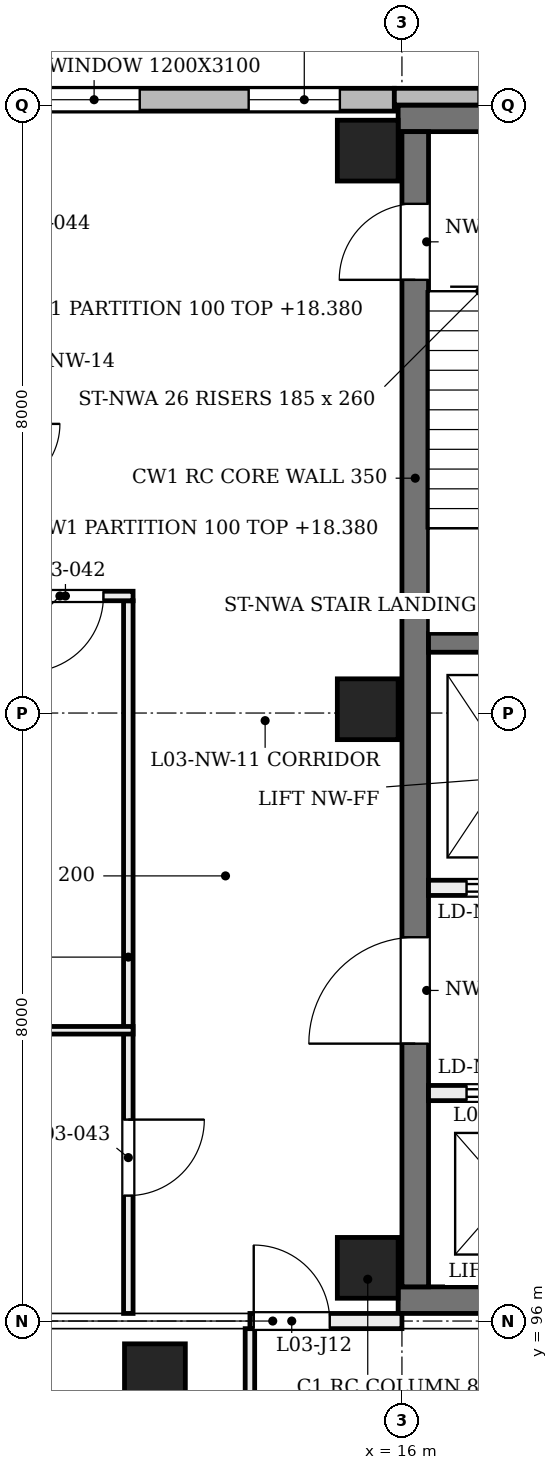
"""IFC4 building model, lengths in metres.
Left out: names, types, materials, properties, quantities, classifications, styles, units other than length and angle.
Written with IfcOpenShell. Run it as: python <this file> out.ifc"""

import sys

from ifc_helpers import new_model, si_unit, direction, frame, frame_2d, origin, origin_2d, place, context, subcontext, project, spatial, rectangle, extrude, element, fill, save


model = new_model("IFC4")
c1 = context("Model", 3, precision=1e-05, world=origin(), true_north=direction((0.0, 1.0)))
c2 = subcontext(c1, "Body", "Model", "MODEL_VIEW")
j1 = project(units=[si_unit("LENGTHUNIT", "METRE"), si_unit("PLANEANGLEUNIT", "RADIAN")], contexts=[c1])
p1 = place(None, origin())
s1 = spatial("IfcSite", under=j1, at=p1, CompositionType="ELEMENT")
p2 = place(p1, origin())
s2 = spatial("IfcBuilding", under=s1, at=p2, CompositionType="ELEMENT")
p3 = place(p2, frame((0.0, 0.0, 14.4)))
s3 = spatial("IfcBuildingStorey", under=s2, at=p3, CompositionType="ELEMENT", Elevation=14.4)
for number, where, z_axis, x_axis in (
    (1, (15.95, 96.275, 0.0), (0.0, 0.0, 1.0), (1.0, 0.0, 0.0)),
    (2, (15.95, 111.825, 0.0), (0.0, 0.0, 1.0), (1.0, 0.0, 0.0)),
):
    element("IfcWall", number, at=place(p3, frame(where, z_axis=z_axis, x_axis=x_axis)), inside=s3, PredefinedType="SHEAR", context=c2, shape_type="SweptSolid", body=[
        extrude(rectangle(XDim=7.95, YDim=0.35, at=frame_2d((3.975, 0.0))), origin(), (0.0, 0.0, 1.0), 4.58),
    ])
p4 = place(p3, frame((16.175, 96.45, 0.0), z_axis=(0.0, 0.0, 1.0), x_axis=(0.0, 1.0, 0.0)))
e3 = element("IfcWall", 3, at=p4, inside=s3, PredefinedType="SHEAR", context=c2, shape_type="SweptSolid", body=[
    extrude(rectangle(XDim=15.2, YDim=0.35, at=frame_2d((7.6, 0.0))), origin(), (0.0, 0.0, 1.0), 4.58),
])
p5 = place(p4, frame((13.25, 0.0, 0.0)))
e4 = element("IfcOpeningElement", 4, at=p5, cuts=e3, PredefinedType="OPENING", context=c2, shape_type="SweptSolid", body=[
    extrude(rectangle(XDim=1.0, YDim=2.1, at=frame_2d((0.5, 1.05))), frame((0.0, 0.185, 0.0), z_axis=(0.0, -1.0, 0.0), x_axis=(1.0, 0.0, 0.0)), (0.0, 0.0, 1.0), 0.37),
])
p6 = place(p4, frame((3.2, 0.0, 0.0)))
e5 = element("IfcOpeningElement", 5, at=p6, cuts=e3, PredefinedType="OPENING", context=c2, shape_type="SweptSolid", body=[
    extrude(rectangle(XDim=1.4, YDim=2.1, at=frame_2d((0.7, 1.05))), frame((0.0, 0.185, 0.0), z_axis=(0.0, -1.0, 0.0), x_axis=(1.0, 0.0, 0.0)), (0.0, 0.0, 1.0), 0.37),
])
for number, where, z_axis, x_axis in (
    (6, (15.55, 96.7, 0.0), (0.0, 0.0, 1.0), (1.0, 0.0, 0.0)),
    (7, (15.55, 104.05, 0.0), (0.0, 0.0, 1.0), (1.0, 0.0, 0.0)),
    (8, (15.55, 111.4, 0.0), (0.0, 0.0, 1.0), (1.0, 0.0, 0.0)),
):
    element("IfcColumn", number, at=place(p3, frame(where, z_axis=z_axis, x_axis=x_axis)), inside=s3, PredefinedType="COLUMN", context=c2, shape_type="SweptSolid", body=[
        extrude(rectangle(XDim=0.8, YDim=0.8, at=origin_2d()), origin(), (0.0, 0.0, 1.0), 4.8),
    ])
p7 = place(p3, frame((13.0, 95.3, 0.0), z_axis=(-0.203952265704, 0.0, 0.978980833987), x_axis=(0.0, -1.0, 0.0)))
e9 = element("IfcColumn", 9, at=p7, inside=s3, PredefinedType="COLUMN", context=c2, shape_type="SweptSolid", body=[
    extrude(rectangle(XDim=0.8, YDim=0.8, at=origin_2d()), origin(), (0.0, 0.0, 1.0), 4.903),
])
p8 = place(p3, frame((8.0, 112.07, 0.0), z_axis=(0.0, 0.0, 1.0), x_axis=(1.0, 0.0, 0.0)))
e10 = element("IfcWall", 10, at=p8, inside=s3, PredefinedType="SOLIDWALL", context=c2, shape_type="SweptSolid", body=[
    extrude(rectangle(XDim=7.9, YDim=0.3, at=frame_2d((3.95, 0.0))), origin(), (0.0, 0.0, 1.0), 3.9),
])
p9 = place(p8, frame((0.717, 0.0, 0.75)))
e11 = element("IfcOpeningElement", 11, at=p9, cuts=e10, PredefinedType="OPENING", context=c2, shape_type="SweptSolid", body=[
    extrude(rectangle(XDim=1.2, YDim=3.1, at=frame_2d((0.6, 1.55))), frame((0.0, 0.16, 0.0), z_axis=(0.0, -1.0, 0.0), x_axis=(1.0, 0.0, 0.0)), (0.0, 0.0, 1.0), 0.32),
])
p10 = place(p8, frame((3.35, 0.0, 0.75)))
e12 = element("IfcOpeningElement", 12, at=p10, cuts=e10, PredefinedType="OPENING", context=c2, shape_type="SweptSolid", body=[
    extrude(rectangle(XDim=1.2, YDim=3.1, at=frame_2d((0.6, 1.55))), frame((0.0, 0.16, 0.0), z_axis=(0.0, -1.0, 0.0), x_axis=(1.0, 0.0, 0.0)), (0.0, 0.0, 1.0), 0.32),
])
p11 = place(p8, frame((5.983, 0.0, 0.75)))
e13 = element("IfcOpeningElement", 13, at=p11, cuts=e10, PredefinedType="OPENING", context=c2, shape_type="SweptSolid", body=[
    extrude(rectangle(XDim=1.2, YDim=3.1, at=frame_2d((0.6, 1.55))), frame((0.0, 0.16, 0.0), z_axis=(0.0, -1.0, 0.0), x_axis=(1.0, 0.0, 0.0)), (0.0, 0.0, 1.0), 0.32),
])
p12 = place(p3, frame((15.9, 112.11, 0.0), z_axis=(0.0, 0.0, 1.0), x_axis=(1.0, 0.0, 0.0)))
e14 = element("IfcWall", 14, at=p12, inside=s3, PredefinedType="SOLIDWALL", context=c2, shape_type="SweptSolid", body=[
    extrude(rectangle(XDim=8.2, YDim=0.22, at=frame_2d((4.1, 0.0))), origin(), (0.0, 0.0, 1.0), 3.9),
])
p13 = place(p12, frame((1.108, 0.0, 0.9)))
e15 = element("IfcOpeningElement", 15, at=p13, cuts=e14, PredefinedType="OPENING", context=c2, shape_type="SweptSolid", body=[
    extrude(rectangle(XDim=0.45, YDim=2.6, at=frame_2d((0.225, 1.3))), frame((0.0, 0.12, 0.0), z_axis=(0.0, -1.0, 0.0), x_axis=(1.0, 0.0, 0.0)), (0.0, 0.0, 1.0), 0.24),
])
p14 = place(p12, frame((3.775, 0.0, 0.9)))
e16 = element("IfcOpeningElement", 16, at=p14, cuts=e14, PredefinedType="OPENING", context=c2, shape_type="SweptSolid", body=[
    extrude(rectangle(XDim=0.45, YDim=2.6, at=frame_2d((0.225, 1.3))), frame((0.0, 0.12, 0.0), z_axis=(0.0, -1.0, 0.0), x_axis=(1.0, 0.0, 0.0)), (0.0, 0.0, 1.0), 0.24),
])
p15 = place(p12, frame((6.442, 0.0, 0.9)))
e17 = element("IfcOpeningElement", 17, at=p15, cuts=e14, PredefinedType="OPENING", context=c2, shape_type="SweptSolid", body=[
    extrude(rectangle(XDim=0.45, YDim=2.6, at=frame_2d((0.225, 1.3))), frame((0.0, 0.12, 0.0), z_axis=(0.0, -1.0, 0.0), x_axis=(1.0, 0.0, 0.0)), (0.0, 0.0, 1.0), 0.24),
])
p16 = place(p3, frame((16.35, 104.925, 0.0), z_axis=(0.0, 0.0, 1.0), x_axis=(1.0, 0.0, 0.0)))
e18 = element("IfcWall", 18, at=p16, inside=s3, PredefinedType="SOLIDWALL", context=c2, shape_type="SweptSolid", body=[
    extrude(rectangle(XDim=3.1, YDim=0.25, at=frame_2d((1.55, 0.0))), origin(), (0.0, 0.0, 1.0), 4.55),
])
p17 = place(p3, frame((16.35, 101.7, 0.0), z_axis=(0.0, 0.0, 1.0), x_axis=(1.0, 0.0, 0.0)))
e19 = element("IfcWall", 19, at=p17, inside=s3, PredefinedType="SOLIDWALL", context=c2, shape_type="SweptSolid", body=[
    extrude(rectangle(XDim=7.2, YDim=0.2, at=frame_2d((3.6, 0.0))), origin(), (0.0, 0.0, 1.0), 4.55),
])
p18 = place(p17, frame((0.5, 0.0, 0.0)))
e20 = element("IfcOpeningElement", 20, at=p18, cuts=e19, PredefinedType="OPENING", context=c2, shape_type="SweptSolid", body=[
    extrude(rectangle(XDim=1.1, YDim=2.1, at=frame_2d((0.55, 1.05))), frame((0.0, 0.11, 0.0), z_axis=(0.0, -1.0, 0.0), x_axis=(1.0, 0.0, 0.0)), (0.0, 0.0, 1.0), 0.22),
])
p19 = place(p17, frame((5.6, 0.0, 0.0)))
e21 = element("IfcOpeningElement", 21, at=p19, cuts=e19, PredefinedType="OPENING", context=c2, shape_type="SweptSolid", body=[
    extrude(rectangle(XDim=1.1, YDim=2.1, at=frame_2d((0.55, 1.05))), frame((0.0, 0.11, 0.0), z_axis=(0.0, -1.0, 0.0), x_axis=(1.0, 0.0, 0.0)), (0.0, 0.0, 1.0), 0.22),
])
p20 = place(p17, frame((3.1, 0.0, 0.0)))
e22 = element("IfcOpeningElement", 22, at=p20, cuts=e19, PredefinedType="OPENING", context=c2, shape_type="SweptSolid", body=[
    extrude(rectangle(XDim=1.0, YDim=2.1, at=frame_2d((0.5, 1.05))), frame((0.0, 0.11, 0.0), z_axis=(0.0, -1.0, 0.0), x_axis=(1.0, 0.0, 0.0)), (0.0, 0.0, 1.0), 0.22),
])
p21 = place(p3, frame((16.35, 99.0, 0.0), z_axis=(0.0, 0.0, 1.0), x_axis=(1.0, 0.0, 0.0)))
e23 = element("IfcWall", 23, at=p21, inside=s3, PredefinedType="SOLIDWALL", context=c2, shape_type="SweptSolid", body=[
    extrude(rectangle(XDim=7.2, YDim=0.2, at=frame_2d((3.6, 0.0))), origin(), (0.0, 0.0, 1.0), 4.55),
])
p22 = place(p21, frame((0.5, 0.0, 0.0)))
e24 = element("IfcOpeningElement", 24, at=p22, cuts=e23, PredefinedType="OPENING", context=c2, shape_type="SweptSolid", body=[
    extrude(rectangle(XDim=1.1, YDim=2.1, at=frame_2d((0.55, 1.05))), frame((0.0, 0.11, 0.0), z_axis=(0.0, -1.0, 0.0), x_axis=(1.0, 0.0, 0.0)), (0.0, 0.0, 1.0), 0.22),
])
p23 = place(p21, frame((5.6, 0.0, 0.0)))
e25 = element("IfcOpeningElement", 25, at=p23, cuts=e23, PredefinedType="OPENING", context=c2, shape_type="SweptSolid", body=[
    extrude(rectangle(XDim=1.1, YDim=2.1, at=frame_2d((0.55, 1.05))), frame((0.0, 0.11, 0.0), z_axis=(0.0, -1.0, 0.0), x_axis=(1.0, 0.0, 0.0)), (0.0, 0.0, 1.0), 0.22),
])
p24 = place(p21, frame((3.1, 0.0, 0.0)))
e26 = element("IfcOpeningElement", 26, at=p24, cuts=e23, PredefinedType="OPENING", context=c2, shape_type="SweptSolid", body=[
    extrude(rectangle(XDim=1.0, YDim=2.1, at=frame_2d((0.5, 1.05))), frame((0.0, 0.11, 0.0), z_axis=(0.0, -1.0, 0.0), x_axis=(1.0, 0.0, 0.0)), (0.0, 0.0, 1.0), 0.22),
])
p25 = place(p3, frame((14.0, 91.805, 0.0), z_axis=(0.0, 0.0, 1.0), x_axis=(0.0, 1.0, 0.0)))
e27 = element("IfcWall", 27, at=p25, inside=s3, PredefinedType="PARTITIONING", context=c2, shape_type="SweptSolid", body=[
    extrude(rectangle(XDim=4.095, YDim=0.125, at=frame_2d((2.047, 0.0))), origin(), (0.0, 0.0, 1.0), 3.88),
])
p26 = place(p25, frame((1.745, 0.0, 0.0)))
e28 = element("IfcOpeningElement", 28, at=p26, cuts=e27, PredefinedType="OPENING", context=c2, shape_type="SweptSolid", body=[
    extrude(rectangle(XDim=1.15, YDim=2.1, at=frame_2d((0.575, 1.05))), frame((0.0, 0.073, 0.0), z_axis=(0.0, -1.0, 0.0), x_axis=(1.0, 0.0, 0.0)), (0.0, 0.0, 1.0), 0.145),
])
p27 = place(p3, frame((12.4, 96.1, 0.0), z_axis=(0.0, 0.0, 1.0), x_axis=(0.0, 1.0, 0.0)))
e29 = element("IfcWall", 29, at=p27, inside=s3, PredefinedType="PARTITIONING", context=c2, shape_type="SweptSolid", body=[
    extrude(rectangle(XDim=9.377, YDim=0.125, at=frame_2d((4.688, 0.0))), origin(), (0.0, 0.0, 1.0), 3.88),
])
p28 = place(p27, frame((1.551, 0.0, 0.0)))
e30 = element("IfcOpeningElement", 30, at=p28, cuts=e29, PredefinedType="OPENING", context=c2, shape_type="SweptSolid", body=[
    extrude(rectangle(XDim=1.0, YDim=2.1, at=frame_2d((0.5, 1.05))), frame((0.0, 0.073, 0.0), z_axis=(0.0, -1.0, 0.0), x_axis=(1.0, 0.0, 0.0)), (0.0, 0.0, 1.0), 0.145),
])
p29 = place(p3, frame((8.3, 99.826, 0.0), z_axis=(0.0, 0.0, 1.0), x_axis=(1.0, 0.0, 0.0)))
e31 = element("IfcWall", 31, at=p29, inside=s3, PredefinedType="PARTITIONING", context=c2, shape_type="SweptSolid", body=[
    extrude(rectangle(XDim=4.162, YDim=0.1, at=frame_2d((2.081, 0.0))), origin(), (0.0, 0.0, 1.0), 3.98),
])
p30 = place(p3, frame((10.538, 105.54, 0.0), z_axis=(0.0, 0.0, 1.0), x_axis=(1.0, 0.0, 0.0)))
e32 = element("IfcWall", 32, at=p30, inside=s3, PredefinedType="PARTITIONING", context=c2, shape_type="SweptSolid", body=[
    extrude(rectangle(XDim=1.925, YDim=0.125, at=frame_2d((0.962, 0.0))), origin(), (0.0, 0.0, 1.0), 4.56),
])
p31 = place(p30, frame((0.535, 0.0, 0.0)))
e33 = element("IfcOpeningElement", 33, at=p31, cuts=e32, PredefinedType="OPENING", context=c2, shape_type="SweptSolid", body=[
    extrude(rectangle(XDim=1.0, YDim=2.1, at=frame_2d((0.5, 1.05))), frame((0.0, 0.073, 0.0), z_axis=(0.0, -1.0, 0.0), x_axis=(1.0, 0.0, 0.0)), (0.0, 0.0, 1.0), 0.145),
])
p32 = place(p3, frame((14.0, 96.0, 0.0), z_axis=(0.0, 0.0, 1.0), x_axis=(1.0, 0.0, 0.0)))
e34 = element("IfcWall", 34, at=p32, inside=s3, PredefinedType="PARTITIONING", context=c2, shape_type="SweptSolid", body=[
    extrude(rectangle(XDim=2.0, YDim=0.2, at=frame_2d((1.0, 0.0))), origin(), (0.0, 0.0, 1.0), 3.88),
])
p33 = place(p32, frame((0.05, 0.0, 0.0)))
e35 = element("IfcOpeningElement", 35, at=p33, cuts=e34, PredefinedType="OPENING", context=c2, shape_type="SweptSolid", body=[
    extrude(rectangle(XDim=1.0, YDim=2.1, at=frame_2d((0.5, 1.05))), frame((0.0, 0.11, 0.0), z_axis=(0.0, -1.0, 0.0), x_axis=(1.0, 0.0, 0.0)), (0.0, 0.0, 1.0), 0.22),
])
p34 = place(p10, origin())
e36 = element("IfcWindow", 36, at=p34, inside=s3, PartitioningType="SINGLE_PANEL", PredefinedType="WINDOW", context=c2, shape_type="SweptSolid", body=[
    extrude(rectangle(XDim=1.2, YDim=3.1, at=frame_2d((0.6, 1.55))), frame((0.0, 0.03, 0.0), z_axis=(0.0, -1.0, 0.0), x_axis=(1.0, 0.0, 0.0)), (0.0, 0.0, 1.0), 0.06),
])
fill(e12, e36)
p35 = place(p11, origin())
e37 = element("IfcWindow", 37, at=p35, inside=s3, PartitioningType="SINGLE_PANEL", PredefinedType="WINDOW", context=c2, shape_type="SweptSolid", body=[
    extrude(rectangle(XDim=1.2, YDim=3.1, at=frame_2d((0.6, 1.55))), frame((0.0, 0.03, 0.0), z_axis=(0.0, -1.0, 0.0), x_axis=(1.0, 0.0, 0.0)), (0.0, 0.0, 1.0), 0.06),
])
fill(e13, e37)
p36 = place(p5, origin())
e38 = element("IfcDoor", 38, at=p36, inside=s3, OperationType="SINGLE_SWING_LEFT", PredefinedType="DOOR", context=c2, shape_type="SweptSolid", body=[
    extrude(rectangle(XDim=1.0, YDim=2.1, at=frame_2d((0.5, 1.05))), frame((0.0, 0.025, 0.0), z_axis=(0.0, -1.0, 0.0), x_axis=(1.0, 0.0, 0.0)), (0.0, 0.0, 1.0), 0.05),
])
fill(e4, e38)
p37 = place(p18, frame((1.1, 0.0, 0.0), z_axis=(0.0, 0.0, 1.0), x_axis=(-1.0, 0.0, 0.0)))
e39 = element("IfcDoor", 39, at=p37, inside=s3, OperationType="DOUBLE_DOOR_SLIDING", PredefinedType="DOOR", context=c2, shape_type="SweptSolid", body=[
    extrude(rectangle(XDim=1.1, YDim=2.1, at=frame_2d((0.55, 1.05))), frame((0.0, 0.025, 0.0), z_axis=(0.0, -1.0, 0.0), x_axis=(1.0, 0.0, 0.0)), (0.0, 0.0, 1.0), 0.05),
])
fill(e20, e39)
p38 = place(p22, origin())
e40 = element("IfcDoor", 40, at=p38, inside=s3, OperationType="DOUBLE_DOOR_SLIDING", PredefinedType="DOOR", context=c2, shape_type="SweptSolid", body=[
    extrude(rectangle(XDim=1.1, YDim=2.1, at=frame_2d((0.55, 1.05))), frame((0.0, 0.025, 0.0), z_axis=(0.0, -1.0, 0.0), x_axis=(1.0, 0.0, 0.0)), (0.0, 0.0, 1.0), 0.05),
])
fill(e24, e40)
p39 = place(p6, origin())
e41 = element("IfcDoor", 41, at=p39, inside=s3, OperationType="SINGLE_SWING_LEFT", PredefinedType="DOOR", context=c2, shape_type="SweptSolid", body=[
    extrude(rectangle(XDim=1.4, YDim=2.1, at=frame_2d((0.7, 1.05))), frame((0.0, 0.025, 0.0), z_axis=(0.0, -1.0, 0.0), x_axis=(1.0, 0.0, 0.0)), (0.0, 0.0, 1.0), 0.05),
])
fill(e5, e41)
p40 = place(p31, frame((1.0, 0.0, 0.0), z_axis=(0.0, 0.0, 1.0), x_axis=(-1.0, 0.0, 0.0)))
e42 = element("IfcDoor", 42, at=p40, inside=s3, OperationType="SINGLE_SWING_LEFT", PredefinedType="DOOR", context=c2, shape_type="SweptSolid", body=[
    extrude(rectangle(XDim=1.0, YDim=2.1, at=frame_2d((0.5, 1.05))), frame((0.0, 0.025, 0.0), z_axis=(0.0, -1.0, 0.0), x_axis=(1.0, 0.0, 0.0)), (0.0, 0.0, 1.0), 0.05),
])
fill(e33, e42)
p41 = place(p28, origin())
e43 = element("IfcDoor", 43, at=p41, inside=s3, OperationType="SINGLE_SWING_RIGHT", PredefinedType="DOOR", context=c2, shape_type="SweptSolid", body=[
    extrude(rectangle(XDim=1.0, YDim=2.1, at=frame_2d((0.5, 1.05))), frame((0.0, 0.025, 0.0), z_axis=(0.0, -1.0, 0.0), x_axis=(1.0, 0.0, 0.0)), (0.0, 0.0, 1.0), 0.05),
])
fill(e30, e43)
p42 = place(p33, origin())
e44 = element("IfcDoor", 44, at=p42, inside=s3, OperationType="SINGLE_SWING_LEFT", PredefinedType="DOOR", context=c2, shape_type="SweptSolid", body=[
    extrude(rectangle(XDim=1.0, YDim=2.1, at=frame_2d((0.5, 1.05))), frame((0.0, 0.025, 0.0), z_axis=(0.0, -1.0, 0.0), x_axis=(1.0, 0.0, 0.0)), (0.0, 0.0, 1.0), 0.05),
])
fill(e35, e44)
save(model, sys.argv[1])
